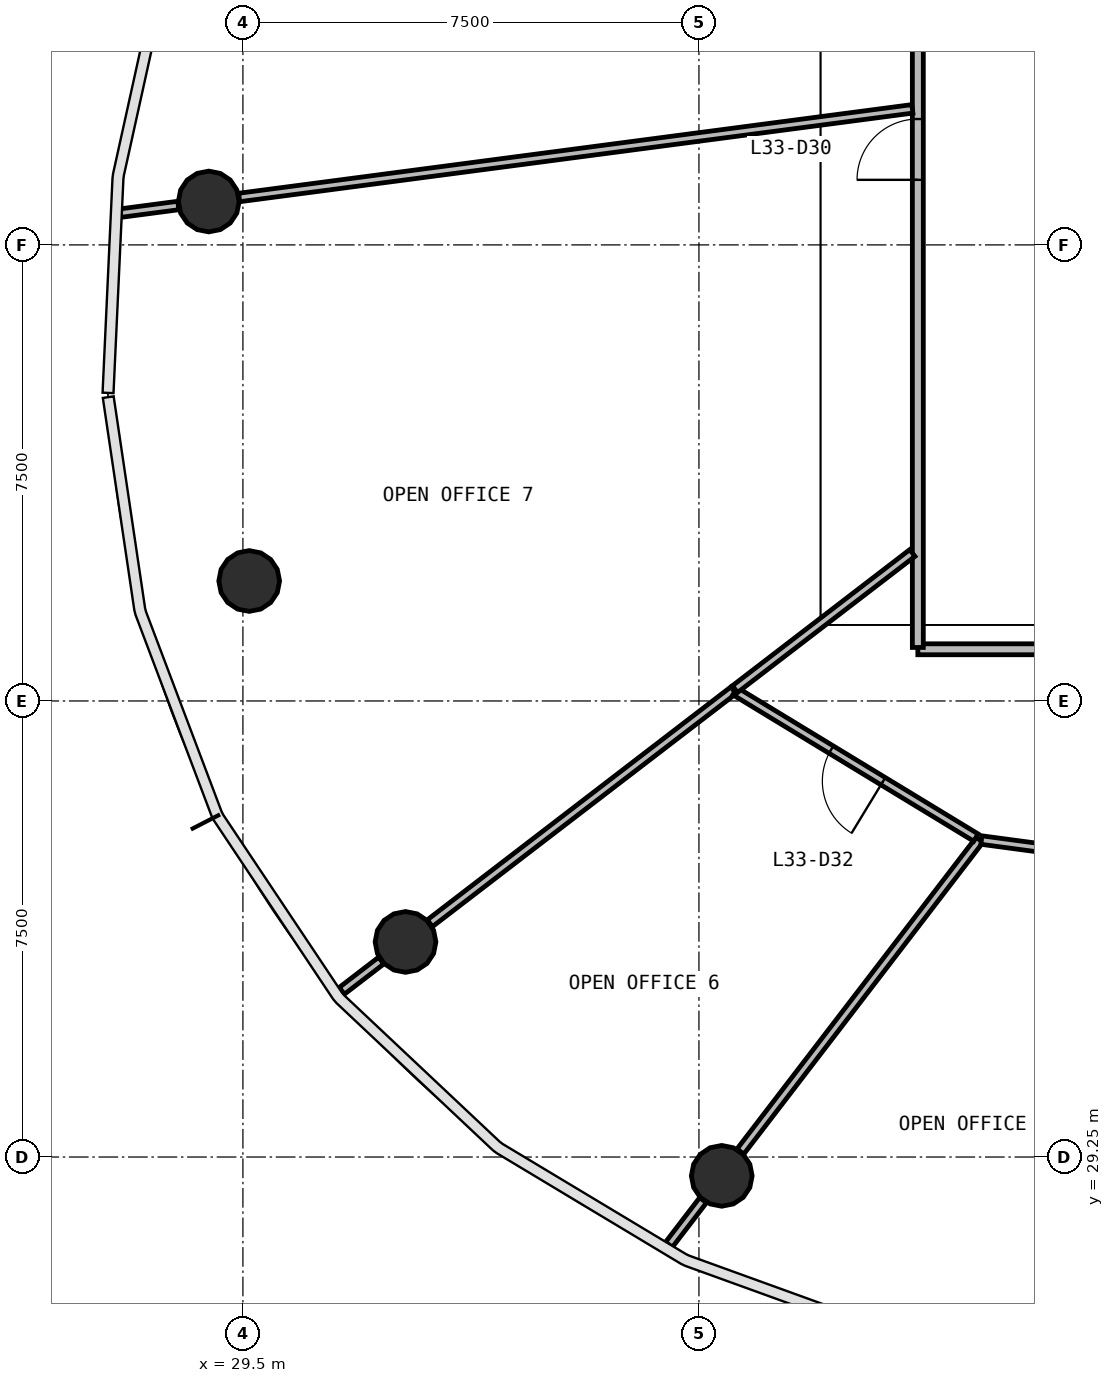
"""IFC4 building model, lengths in metres.
Left out: names, types, materials, properties, quantities, classifications, styles, units other than length and angle.
Written with IfcOpenShell. Run it as: python <this file> out.ifc"""

import sys

from ifc_helpers import new_model, si_unit, direction, frame, frame_2d, origin, origin_2d, place, context, subcontext, project, spatial, rectangle, circle, extrude, source, transform, mapped, element, fill, save


model = new_model("IFC4")
c1 = context("Model", 3, precision=1e-05, world=origin(), true_north=direction((0.0, 1.0)))
c2 = subcontext(c1, "Body", "Model", "MODEL_VIEW")
j1 = project(units=[si_unit("LENGTHUNIT", "METRE"), si_unit("PLANEANGLEUNIT", "RADIAN")], contexts=[c1])
p1 = place(None, origin())
s1 = spatial("IfcSite", under=j1, at=p1, CompositionType="ELEMENT")
p2 = place(p1, origin())
s2 = spatial("IfcBuilding", under=s1, at=p2, CompositionType="ELEMENT")
p3 = place(p2, frame((0.0, 0.0, 140.9)))
s3 = spatial("IfcBuildingStorey", under=s2, at=p3, CompositionType="ELEMENT", Elevation=140.9)
m1 = source(origin(), c2, "Body", "SweptSolid", [
    extrude(circle(Radius=0.5, at=origin_2d()), origin(), (0.0, 0.0, 1.0), 3.9),
])
for number, where, z_axis, x_axis in (
    (1, (28.938, 44.964, 0.0), (0.0, 0.0, 1.0), (1.0, 0.0, 0.0)),
    (2, (29.603, 38.723, 0.0), (0.0, 0.0, 1.0), (1.0, 0.0, 0.0)),
    (3, (32.174, 32.787, 0.0), (0.0, 0.0, 1.0), (1.0, 0.0, 0.0)),
    (4, (37.375, 28.94, 0.0), (0.0, 0.0, 1.0), (1.0, 0.0, 0.0)),
):
    element("IfcColumn", number, at=place(p3, frame(where, z_axis=z_axis, x_axis=x_axis)), inside=s3, PredefinedType="COLUMN", context=c2, shape_type="MappedRepresentation", body=[
        mapped(m1, transform((0.0, 0.0, 0.0), scale=1.0)),
    ])
p4 = place(p3, frame((63.4, 37.6, 0.0), z_axis=(0.0, 0.0, 1.0), x_axis=(-1.0, 0.0, 0.0)))
e5 = element("IfcWall", 5, at=p4, inside=s3, PredefinedType="PARTITIONING", context=c2, shape_type="SweptSolid", body=[
    extrude(rectangle(XDim=22.8, YDim=0.18, at=frame_2d((11.4, 0.0))), origin(), (0.0, 0.0, 1.0), 2.88),
])
p5 = place(p4, frame((10.95, 0.0, 0.0)))
e6 = element("IfcOpeningElement", 6, at=p5, cuts=e5, PredefinedType="OPENING", context=c2, shape_type="SweptSolid", body=[
    extrude(rectangle(XDim=1.0, YDim=2.1, at=frame_2d((0.5, 1.05))), frame((0.0, 0.1, 0.0), z_axis=(0.0, -1.0, 0.0), x_axis=(1.0, 0.0, 0.0)), (0.0, 0.0, 1.0), 0.2),
])
p6 = place(p4, frame((8.75, 0.0, 0.0)))
e7 = element("IfcOpeningElement", 7, at=p6, cuts=e5, PredefinedType="OPENING", context=c2, shape_type="SweptSolid", body=[
    extrude(rectangle(XDim=1.0, YDim=2.1, at=frame_2d((0.5, 1.05))), frame((0.0, 0.1, 0.0), z_axis=(0.0, -1.0, 0.0), x_axis=(1.0, 0.0, 0.0)), (0.0, 0.0, 1.0), 0.2),
])
p7 = place(p3, frame((40.6, 37.63, 0.0), z_axis=(0.0, 0.0, 1.0), x_axis=(0.0, 1.0, 0.0)))
e8 = element("IfcWall", 8, at=p7, inside=s3, PredefinedType="PARTITIONING", context=c2, shape_type="SweptSolid", body=[
    extrude(rectangle(XDim=20.74, YDim=0.18, at=frame_2d((10.37, 0.0))), origin(), (0.0, 0.0, 1.0), 2.88),
])
p8 = place(p7, frame((9.89, 0.0, 0.0)))
e9 = element("IfcOpeningElement", 9, at=p8, cuts=e8, PredefinedType="OPENING", context=c2, shape_type="SweptSolid", body=[
    extrude(rectangle(XDim=1.0, YDim=2.1, at=frame_2d((0.5, 1.05))), frame((0.0, 0.1, 0.0), z_axis=(0.0, -1.0, 0.0), x_axis=(1.0, 0.0, 0.0)), (0.0, 0.0, 1.0), 0.2),
])
p9 = place(p7, frame((7.69, 0.0, 0.0)))
e10 = element("IfcOpeningElement", 10, at=p9, cuts=e8, PredefinedType="OPENING", context=c2, shape_type="SweptSolid", body=[
    extrude(rectangle(XDim=1.0, YDim=2.1, at=frame_2d((0.5, 1.05))), frame((0.0, 0.1, 0.0), z_axis=(0.0, -1.0, 0.0), x_axis=(1.0, 0.0, 0.0)), (0.0, 0.0, 1.0), 0.2),
])
p10 = place(p3, frame((40.51, 46.487, 0.0), z_axis=(0.0, 0.0, 1.0), x_axis=(-0.991446480727, -0.130513891423, 0.0)))
e11 = element("IfcWall", 11, at=p10, inside=s3, PredefinedType="PARTITIONING", context=c2, shape_type="SweptSolid", body=[
    extrude(rectangle(XDim=11.167, YDim=0.14, at=frame_2d((5.584, 0.0))), origin(), (0.0, 0.0, 1.0), 2.88),
])
p11 = place(p3, frame((41.615, 34.467, 0.0), z_axis=(0.0, 0.0, 1.0), x_axis=(-0.608784495995, -0.793335639837, 0.0)))
e12 = element("IfcWall", 12, at=p11, inside=s3, PredefinedType="PARTITIONING", context=c2, shape_type="SweptSolid", body=[
    extrude(rectangle(XDim=6.461, YDim=0.14, at=frame_2d((3.23, 0.0))), origin(), (0.0, 0.0, 1.0), 2.88),
])
p12 = place(p3, frame((37.568, 36.926, 0.0), z_axis=(0.0, 0.0, 1.0), x_axis=(-0.793361598143, -0.608750667015, 0.0)))
e13 = element("IfcWall", 13, at=p12, inside=s3, PredefinedType="PARTITIONING", context=c2, shape_type="SweptSolid", body=[
    extrude(rectangle(XDim=6.295, YDim=0.14, at=frame_2d((3.147, 0.0))), origin(), (0.0, 0.0, 1.0), 2.88),
])
p13 = place(p3, frame((41.555, 34.503, 0.0), z_axis=(0.0, 0.0, 1.0), x_axis=(-0.854565482162, 0.519343659534, 0.0)))
e14 = element("IfcWall", 14, at=p13, inside=s3, PredefinedType="PARTITIONING", context=c2, shape_type="SweptSolid", body=[
    extrude(rectangle(XDim=4.635, YDim=0.14, at=frame_2d((2.318, 0.0))), origin(), (0.0, 0.0, 1.0), 2.88),
])
p14 = place(p13, frame((1.785, 0.0, 0.0)))
e15 = element("IfcOpeningElement", 15, at=p14, cuts=e14, PredefinedType="OPENING", context=c2, shape_type="SweptSolid", body=[
    extrude(rectangle(XDim=1.0, YDim=2.1, at=frame_2d((0.5, 1.05))), frame((0.0, 0.08, 0.0), z_axis=(0.0, -1.0, 0.0), x_axis=(1.0, 0.0, 0.0)), (0.0, 0.0, 1.0), 0.16),
])
p15 = place(p3, frame((46.071, 33.869, 0.0), z_axis=(0.0, 0.0, 1.0), x_axis=(-0.991127820381, 0.132912165233, 0.0)))
e16 = element("IfcWall", 16, at=p15, inside=s3, PredefinedType="PARTITIONING", context=c2, shape_type="SweptSolid", body=[
    extrude(rectangle(XDim=4.465, YDim=0.14, at=frame_2d((2.233, 0.0))), origin(), (0.0, 0.0, 1.0), 2.88),
])
p16 = place(p15, frame((1.815, 0.0, 0.0)))
e17 = element("IfcOpeningElement", 17, at=p16, cuts=e16, PredefinedType="OPENING", context=c2, shape_type="SweptSolid", body=[
    extrude(rectangle(XDim=1.0, YDim=2.1, at=frame_2d((0.5, 1.05))), frame((0.0, 0.08, 0.0), z_axis=(0.0, -1.0, 0.0), x_axis=(1.0, 0.0, 0.0)), (0.0, 0.0, 1.0), 0.16),
])
p17 = place(p3, frame((40.51, 39.183, 0.0), z_axis=(0.0, 0.0, 1.0), x_axis=(-0.793363754773, -0.608747856352, 0.0)))
e18 = element("IfcWall", 18, at=p17, inside=s3, PredefinedType="PARTITIONING", context=c2, shape_type="SweptSolid", body=[
    extrude(rectangle(XDim=3.678, YDim=0.14, at=frame_2d((1.839, 0.0))), origin(), (0.0, 0.0, 1.0), 2.88),
])
p18 = place(p3, frame((28.438, 44.898, 0.0), z_axis=(0.0, 0.0, 1.0), x_axis=(-0.991448245314, -0.130500486067, 0.0)))
e19 = element("IfcWall", 19, at=p18, inside=s3, PredefinedType="PARTITIONING", context=c2, shape_type="SweptSolid", body=[
    extrude(rectangle(XDim=0.962, YDim=0.14, at=frame_2d((0.481, 0.0))), origin(), (0.0, 0.0, 1.0), 2.88),
])
p19 = place(p3, frame((37.068, 28.54, 0.0), z_axis=(0.0, 0.0, 1.0), x_axis=(-0.608853638779, -0.793282576731, 0.0)))
e20 = element("IfcWall", 20, at=p19, inside=s3, PredefinedType="PARTITIONING", context=c2, shape_type="SweptSolid", body=[
    extrude(rectangle(XDim=0.923, YDim=0.14, at=frame_2d((0.461, 0.0))), origin(), (0.0, 0.0, 1.0), 2.88),
])
p20 = place(p3, frame((31.774, 32.48, 0.0), z_axis=(0.0, 0.0, 1.0), x_axis=(-0.793312684763, -0.608814408661, 0.0)))
e21 = element("IfcWall", 21, at=p20, inside=s3, PredefinedType="PARTITIONING", context=c2, shape_type="SweptSolid", body=[
    extrude(rectangle(XDim=0.816, YDim=0.14, at=frame_2d((0.408, 0.0))), origin(), (0.0, 0.0, 1.0), 2.88),
])
m2 = source(origin(), c2, "Body", "SweptSolid", [
    extrude(rectangle(XDim=1.0, YDim=2.1, at=frame_2d((0.5, 1.05))), frame((0.0, 0.025, 0.0), z_axis=(0.0, -1.0, 0.0), x_axis=(1.0, 0.0, 0.0)), (0.0, 0.0, 1.0), 0.05),
])
p21 = place(p9, origin())
e22 = element("IfcDoor", 22, at=p21, inside=s3, OperationType="SINGLE_SWING_LEFT", PredefinedType="DOOR", context=c2, shape_type="MappedRepresentation", body=[
    mapped(m2, transform((0.0, 0.0, 0.0), scale=1.0)),
])
fill(e10, e22)
p22 = place(p14, origin())
e23 = element("IfcDoor", 23, at=p22, inside=s3, OperationType="SINGLE_SWING_LEFT", PredefinedType="DOOR", context=c2, shape_type="MappedRepresentation", body=[
    mapped(m2, transform((0.0, 0.0, 0.0), scale=1.0)),
])
fill(e15, e23)
save(model, sys.argv[1])
